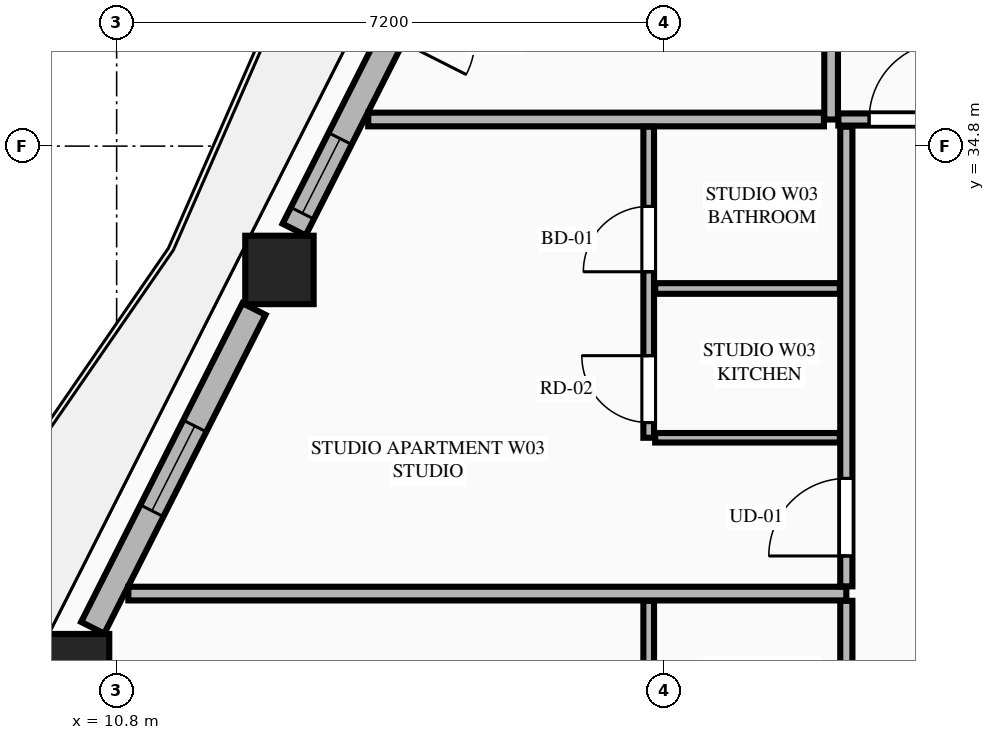
"""IFC4 building model, lengths in metres.
Left out: names, types, materials, properties, quantities, classifications, styles, units other than length and angle.
Written with IfcOpenShell. Run it as: python <this file> out.ifc"""

import sys

from ifc_helpers import new_model, si_unit, direction, frame, frame_2d, origin, origin_2d, place, context, subcontext, project, spatial, rectangle, extrude, element, fill, save


model = new_model("IFC4")
c1 = context("Model", 3, precision=1e-05, world=origin(), true_north=direction((0.0, 1.0)))
c2 = subcontext(c1, "Body", "Model", "MODEL_VIEW")
j1 = project(units=[si_unit("LENGTHUNIT", "METRE"), si_unit("PLANEANGLEUNIT", "RADIAN")], contexts=[c1])
p1 = place(None, origin())
s1 = spatial("IfcSite", under=j1, at=p1, CompositionType="ELEMENT")
p2 = place(p1, origin())
s2 = spatial("IfcBuilding", under=s1, at=p2, CompositionType="ELEMENT")
p3 = place(p2, frame((0.0, 0.0, 203.85)))
s3 = spatial("IfcBuildingStorey", under=s2, at=p3, CompositionType="ELEMENT", Elevation=203.85)
for number, where, z_axis, x_axis in (
    (1, (12.942, 33.171, 0.0), (0.0, 0.0, 1.0), (1.0, 0.0, 0.0)),
    (2, (10.253, 27.932, 0.0), (0.0, 0.0, 1.0), (1.0, 0.0, 0.0)),
):
    element("IfcColumn", number, at=place(p3, frame(where, z_axis=z_axis, x_axis=x_axis)), inside=s3, PredefinedType="COLUMN", context=c2, shape_type="SweptSolid", body=[
        extrude(rectangle(XDim=0.9, YDim=0.9, at=origin_2d()), origin(), (0.0, 0.0, 1.0), 3.55),
    ])
p4 = place(p3, frame((15.352, 38.083, 0.0), z_axis=(0.0, 0.0, 1.0), x_axis=(-0.451524246964, -0.89225884944, 0.0)))
e3 = element("IfcWall", 3, at=p4, inside=s3, PredefinedType="STANDARD", context=c2, shape_type="SweptSolid", body=[
    extrude(rectangle(XDim=4.91, YDim=0.34, at=frame_2d((2.455, 0.0))), origin(), (0.0, 0.0, 1.0), 2.883),
])
p5 = place(p4, frame((0.968, 0.0, 0.0)))
e4 = element("IfcOpeningElement", 4, at=p5, cuts=e3, PredefinedType="OPENING", context=c2, shape_type="SweptSolid", body=[
    extrude(rectangle(XDim=1.1, YDim=2.25, at=frame_2d((0.55, 1.125))), frame((0.0, 0.18, 0.0), z_axis=(0.0, -1.0, 0.0), x_axis=(1.0, 0.0, 0.0)), (0.0, 0.0, 1.0), 0.36),
])
p6 = place(p4, frame((3.569, 0.0, 0.75)))
e5 = element("IfcOpeningElement", 5, at=p6, cuts=e3, PredefinedType="OPENING", context=c2, shape_type="SweptSolid", body=[
    extrude(rectangle(XDim=1.1, YDim=1.983, at=frame_2d((0.55, 0.991))), frame((0.0, 0.18, 0.0), z_axis=(0.0, -1.0, 0.0), x_axis=(1.0, 0.0, 0.0)), (0.0, 0.0, 1.0), 0.36),
])
p7 = place(p3, frame((12.607, 32.657, 0.0), z_axis=(0.0, 0.0, 1.0), x_axis=(-0.451426298588, -0.892308409096, 0.0)))
e6 = element("IfcWall", 6, at=p7, inside=s3, PredefinedType="STANDARD", context=c2, shape_type="SweptSolid", body=[
    extrude(rectangle(XDim=4.7, YDim=0.34, at=frame_2d((2.35, 0.0))), origin(), (0.0, 0.0, 1.0), 2.883),
])
p8 = place(p7, frame((1.725, 0.0, 0.75)))
e7 = element("IfcOpeningElement", 7, at=p8, cuts=e6, PredefinedType="OPENING", context=c2, shape_type="SweptSolid", body=[
    extrude(rectangle(XDim=1.25, YDim=1.95, at=frame_2d((0.625, 0.975))), frame((0.0, 0.18, 0.0), z_axis=(0.0, -1.0, 0.0), x_axis=(1.0, 0.0, 0.0)), (0.0, 0.0, 1.0), 0.36),
])
p9 = place(p3, frame((20.2, 35.15, 0.0), z_axis=(0.0, 0.0, 1.0), x_axis=(0.0, 1.0, 0.0)))
e8 = element("IfcWall", 8, at=p9, inside=s3, PredefinedType="PARTITIONING", context=c2, shape_type="SweptSolid", body=[
    extrude(rectangle(XDim=10.482, YDim=0.18, at=frame_2d((5.241, 0.0))), origin(), (0.0, 0.0, 1.0), 3.35),
])
p10 = place(p3, frame((20.295, 35.15, 0.0), z_axis=(0.0, 0.0, 1.0), x_axis=(1.0, 0.0, 0.0)))
e9 = element("IfcWall", 9, at=p10, inside=s3, PredefinedType="PARTITIONING", context=c2, shape_type="SweptSolid", body=[
    extrude(rectangle(XDim=15.553, YDim=0.16, at=frame_2d((7.776, 0.0))), origin(), (0.0, 0.0, 1.0), 3.35),
])
p11 = place(p10, frame((0.405, 0.0, 0.0)))
e10 = element("IfcOpeningElement", 10, at=p11, cuts=e9, PredefinedType="OPENING", context=c2, shape_type="SweptSolid", body=[
    extrude(rectangle(XDim=1.02, YDim=2.25, at=frame_2d((0.51, 1.125))), frame((0.0, 0.09, 0.0), z_axis=(0.0, -1.0, 0.0), x_axis=(1.0, 0.0, 0.0)), (0.0, 0.0, 1.0), 0.18),
])
p12 = place(p3, frame((14.11, 35.15, 0.0), z_axis=(0.0, 0.0, 1.0), x_axis=(1.0, 0.0, 0.0)))
e11 = element("IfcWall", 11, at=p12, inside=s3, PredefinedType="PARTITIONING", context=c2, shape_type="SweptSolid", body=[
    extrude(rectangle(XDim=5.995, YDim=0.18, at=frame_2d((2.998, 0.0))), origin(), (0.0, 0.0, 1.0), 3.35),
])
p13 = place(p3, frame((20.4, 22.771, 0.0), z_axis=(0.0, 0.0, 1.0), x_axis=(0.0, 1.0, 0.0)))
e12 = element("IfcWall", 12, at=p13, inside=s3, PredefinedType="PARTITIONING", context=c2, shape_type="SweptSolid", body=[
    extrude(rectangle(XDim=6.047, YDim=0.16, at=frame_2d((3.023, 0.0))), origin(), (0.0, 0.0, 1.0), 3.35),
])
p14 = place(p13, frame((0.4, 0.0, 0.0)))
e13 = element("IfcOpeningElement", 13, at=p14, cuts=e12, PredefinedType="OPENING", context=c2, shape_type="SweptSolid", body=[
    extrude(rectangle(XDim=1.02, YDim=2.25, at=frame_2d((0.51, 1.125))), frame((0.0, 0.09, 0.0), z_axis=(0.0, -1.0, 0.0), x_axis=(1.0, 0.0, 0.0)), (0.0, 0.0, 1.0), 0.18),
])
p15 = place(p3, frame((17.8, 24.726, 0.0), z_axis=(0.0, 0.0, 1.0), x_axis=(0.0, 1.0, 0.0)))
e14 = element("IfcWall", 14, at=p15, inside=s3, PredefinedType="PLUMBINGWALL", context=c2, shape_type="SweptSolid", body=[
    extrude(rectangle(XDim=4.092, YDim=0.14, at=frame_2d((2.046, 0.0))), origin(), (0.0, 0.0, 1.0), 3.35),
])
p16 = place(p15, frame((2.184, 0.0, 0.0)))
e15 = element("IfcOpeningElement", 15, at=p16, cuts=e14, PredefinedType="OPENING", context=c2, shape_type="SweptSolid", body=[
    extrude(rectangle(XDim=0.86, YDim=2.1, at=frame_2d((0.43, 1.05))), frame((0.0, 0.08, 0.0), z_axis=(0.0, -1.0, 0.0), x_axis=(1.0, 0.0, 0.0)), (0.0, 0.0, 1.0), 0.16),
])
p17 = place(p15, frame((0.2, 0.0, 0.0)))
e16 = element("IfcOpeningElement", 16, at=p17, cuts=e14, PredefinedType="OPENING", context=c2, shape_type="SweptSolid", body=[
    extrude(rectangle(XDim=0.88, YDim=2.15, at=frame_2d((0.44, 1.075))), frame((0.0, 0.08, 0.0), z_axis=(0.0, -1.0, 0.0), x_axis=(1.0, 0.0, 0.0)), (0.0, 0.0, 1.0), 0.16),
])
p18 = place(p3, frame((10.954, 28.913, 0.0), z_axis=(0.0, 0.0, 1.0), x_axis=(1.0, 0.0, 0.0)))
e17 = element("IfcWall", 17, at=p18, inside=s3, PredefinedType="PARTITIONING", context=c2, shape_type="SweptSolid", body=[
    extrude(rectangle(XDim=9.446, YDim=0.18, at=frame_2d((4.723, 0.0))), origin(), (0.0, 0.0, 1.0), 3.35),
])
p19 = place(p3, frame((20.4, 29.008, 0.0), z_axis=(0.0, 0.0, 1.0), x_axis=(0.0, 1.0, 0.0)))
e18 = element("IfcWall", 18, at=p19, inside=s3, PredefinedType="PARTITIONING", context=c2, shape_type="SweptSolid", body=[
    extrude(rectangle(XDim=6.047, YDim=0.16, at=frame_2d((3.023, 0.0))), origin(), (0.0, 0.0, 1.0), 3.35),
])
p20 = place(p19, frame((0.4, 0.0, 0.0)))
e19 = element("IfcOpeningElement", 19, at=p20, cuts=e18, PredefinedType="OPENING", context=c2, shape_type="SweptSolid", body=[
    extrude(rectangle(XDim=1.02, YDim=2.25, at=frame_2d((0.51, 1.125))), frame((0.0, 0.09, 0.0), z_axis=(0.0, -1.0, 0.0), x_axis=(1.0, 0.0, 0.0)), (0.0, 0.0, 1.0), 0.18),
])
p21 = place(p3, frame((17.885, 30.963, 0.0), z_axis=(0.0, 0.0, 1.0), x_axis=(1.0, 0.0, 0.0)))
e20 = element("IfcWall", 20, at=p21, inside=s3, PredefinedType="PARTITIONING", context=c2, shape_type="SweptSolid", body=[
    extrude(rectangle(XDim=2.43, YDim=0.125, at=frame_2d((1.215, 0.0))), origin(), (0.0, 0.0, 1.0), 3.35),
])
p22 = place(p3, frame((17.8, 30.963, 0.0), z_axis=(0.0, 0.0, 1.0), x_axis=(0.0, 1.0, 0.0)))
e21 = element("IfcWall", 21, at=p22, inside=s3, PredefinedType="PLUMBINGWALL", context=c2, shape_type="SweptSolid", body=[
    extrude(rectangle(XDim=4.092, YDim=0.14, at=frame_2d((2.046, 0.0))), origin(), (0.0, 0.0, 1.0), 3.35),
])
p23 = place(p22, frame((2.184, 0.0, 0.0)))
e22 = element("IfcOpeningElement", 22, at=p23, cuts=e21, PredefinedType="OPENING", context=c2, shape_type="SweptSolid", body=[
    extrude(rectangle(XDim=0.86, YDim=2.1, at=frame_2d((0.43, 1.05))), frame((0.0, 0.08, 0.0), z_axis=(0.0, -1.0, 0.0), x_axis=(1.0, 0.0, 0.0)), (0.0, 0.0, 1.0), 0.16),
])
p24 = place(p22, frame((0.2, 0.0, 0.0)))
e23 = element("IfcOpeningElement", 23, at=p24, cuts=e21, PredefinedType="OPENING", context=c2, shape_type="SweptSolid", body=[
    extrude(rectangle(XDim=0.88, YDim=2.15, at=frame_2d((0.44, 1.075))), frame((0.0, 0.08, 0.0), z_axis=(0.0, -1.0, 0.0), x_axis=(1.0, 0.0, 0.0)), (0.0, 0.0, 1.0), 0.16),
])
p25 = place(p3, frame((17.885, 32.927, 0.0), z_axis=(0.0, 0.0, 1.0), x_axis=(1.0, 0.0, 0.0)))
e24 = element("IfcWall", 24, at=p25, inside=s3, PredefinedType="PLUMBINGWALL", context=c2, shape_type="SweptSolid", body=[
    extrude(rectangle(XDim=2.43, YDim=0.14, at=frame_2d((1.215, 0.0))), origin(), (0.0, 0.0, 1.0), 3.35),
])
p26 = place(p8, origin())
e25 = element("IfcWindow", 25, at=p26, inside=s3, PartitioningType="SINGLE_PANEL", PredefinedType="WINDOW", context=c2, shape_type="SweptSolid", body=[
    extrude(rectangle(XDim=1.25, YDim=1.95, at=frame_2d((0.625, 0.975))), frame((0.0, 0.03, 0.0), z_axis=(0.0, -1.0, 0.0), x_axis=(1.0, 0.0, 0.0)), (0.0, 0.0, 1.0), 0.06),
])
fill(e7, e25)
p27 = place(p11, origin())
e26 = element("IfcDoor", 26, at=p27, inside=s3, OperationType="SINGLE_SWING_RIGHT", PredefinedType="DOOR", context=c2, shape_type="SweptSolid", body=[
    extrude(rectangle(XDim=1.02, YDim=2.25, at=frame_2d((0.51, 1.125))), frame((0.0, 0.025, 0.0), z_axis=(0.0, -1.0, 0.0), x_axis=(1.0, 0.0, 0.0)), (0.0, 0.0, 1.0), 0.05),
])
fill(e10, e26)
p28 = place(p23, origin())
e27 = element("IfcDoor", 27, at=p28, inside=s3, OperationType="SINGLE_SWING_LEFT", PredefinedType="DOOR", context=c2, shape_type="SweptSolid", body=[
    extrude(rectangle(XDim=0.86, YDim=2.1, at=frame_2d((0.43, 1.05))), frame((0.0, 0.025, 0.0), z_axis=(0.0, -1.0, 0.0), x_axis=(1.0, 0.0, 0.0)), (0.0, 0.0, 1.0), 0.05),
])
fill(e22, e27)
p29 = place(p20, origin())
e28 = element("IfcDoor", 28, at=p29, inside=s3, OperationType="SINGLE_SWING_LEFT", PredefinedType="DOOR", context=c2, shape_type="SweptSolid", body=[
    extrude(rectangle(XDim=1.02, YDim=2.25, at=frame_2d((0.51, 1.125))), frame((0.0, 0.025, 0.0), z_axis=(0.0, -1.0, 0.0), x_axis=(1.0, 0.0, 0.0)), (0.0, 0.0, 1.0), 0.05),
])
fill(e19, e28)
p30 = place(p24, origin())
e29 = element("IfcDoor", 29, at=p30, inside=s3, OperationType="SINGLE_SWING_RIGHT", PredefinedType="DOOR", context=c2, shape_type="SweptSolid", body=[
    extrude(rectangle(XDim=0.88, YDim=2.15, at=frame_2d((0.44, 1.075))), frame((0.0, 0.025, 0.0), z_axis=(0.0, -1.0, 0.0), x_axis=(1.0, 0.0, 0.0)), (0.0, 0.0, 1.0), 0.05),
])
fill(e23, e29)
p31 = place(p6, origin())
e30 = element("IfcWindow", 30, at=p31, inside=s3, PartitioningType="SINGLE_PANEL", PredefinedType="WINDOW", context=c2, shape_type="SweptSolid", body=[
    extrude(rectangle(XDim=1.1, YDim=1.983, at=frame_2d((0.55, 0.991))), frame((0.0, 0.03, 0.0), z_axis=(0.0, -1.0, 0.0), x_axis=(1.0, 0.0, 0.0)), (0.0, 0.0, 1.0), 0.06),
])
fill(e5, e30)
save(model, sys.argv[1])
